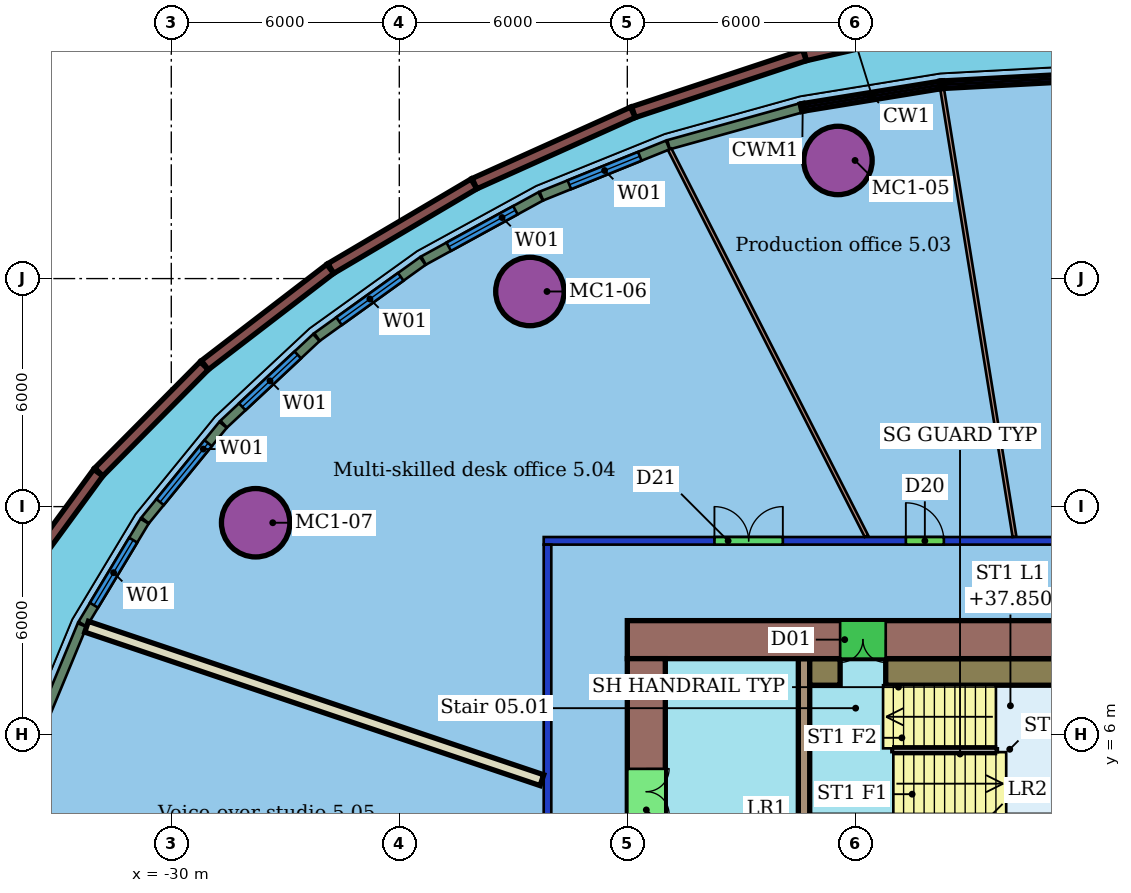
"""IFC4 building model, lengths in metres.
Left out: names, types, materials, properties, quantities, classifications, styles, units other than length and angle.
Written with IfcOpenShell. Run it as: python <this file> out.ifc"""

import sys

from ifc_helpers import new_model, si_unit, direction, frame, frame_2d, origin, origin_2d, place, context, subcontext, project, spatial, rectangle, hollow_circle, extrude, element, fill, save


model = new_model("IFC4")
c1 = context("Model", 3, precision=1e-05, world=origin(), true_north=direction((0.0, 1.0)))
c2 = subcontext(c1, "Body", "Model", "MODEL_VIEW")
j1 = project(units=[si_unit("LENGTHUNIT", "METRE"), si_unit("PLANEANGLEUNIT", "RADIAN")], contexts=[c1])
p1 = place(None, origin())
s1 = spatial("IfcSite", under=j1, at=p1, CompositionType="ELEMENT")
p2 = place(p1, origin())
s2 = spatial("IfcBuilding", under=s1, at=p2, CompositionType="ELEMENT")
p3 = place(p2, frame((0.0, 0.0, 36.0)))
s3 = spatial("IfcBuildingStorey", under=s2, at=p3, CompositionType="ELEMENT", Elevation=36.0)
for number, where, z_axis, x_axis in (
    (1, (-12.458, 21.108, 0.0), (0.0, 0.0, 1.0), (1.0, 0.0, 0.0)),
    (2, (-20.563, 17.66, 0.0), (0.0, 0.0, 1.0), (1.0, 0.0, 0.0)),
    (3, (-27.78, 11.576, 0.0), (0.0, 0.0, 1.0), (1.0, 0.0, 0.0)),
):
    element("IfcColumn", number, at=place(p3, frame(where, z_axis=z_axis, x_axis=x_axis)), inside=s3, PredefinedType="COLUMN", context=c2, shape_type="SweptSolid", body=[
        extrude(hollow_circle(Radius=0.9, WallThickness=0.06, at=origin_2d()), origin(), (0.0, 0.0, 1.0), 3.55),
    ])
p4 = place(p3, frame((-20.1, -11.0, 0.0), z_axis=(0.0, 0.0, 1.0), x_axis=(0.0, 1.0, 0.0)))
e4 = element("IfcWall", 4, at=p4, inside=s3, PredefinedType="PARTITIONING", context=c2, shape_type="SweptSolid", body=[
    extrude(rectangle(XDim=22.0, YDim=0.2, at=frame_2d((11.0, 0.0))), origin(), (0.0, 0.0, 1.0), 2.85),
])
p5 = place(p4, frame((13.38, 0.0, 0.0)))
e5 = element("IfcOpeningElement", 5, at=p5, cuts=e4, PredefinedType="OPENING", context=c2, shape_type="SweptSolid", body=[
    extrude(rectangle(XDim=1.1, YDim=2.1, at=frame_2d((0.55, 1.05))), frame((0.0, 0.11, 0.0), z_axis=(0.0, -1.0, 0.0), x_axis=(1.0, 0.0, 0.0)), (0.0, 0.0, 1.0), 0.22),
])
p6 = place(p4, frame((6.18, 0.0, 0.0)))
e6 = element("IfcOpeningElement", 6, at=p6, cuts=e4, PredefinedType="OPENING", context=c2, shape_type="SweptSolid", body=[
    extrude(rectangle(XDim=1.8, YDim=2.1, at=frame_2d((0.9, 1.05))), frame((0.0, 0.11, 0.0), z_axis=(0.0, -1.0, 0.0), x_axis=(1.0, 0.0, 0.0)), (0.0, 0.0, 1.0), 0.22),
])
p7 = place(p3, frame((-20.2, 11.1, 0.0), z_axis=(0.0, 0.0, 1.0), x_axis=(1.0, 0.0, 0.0)))
e7 = element("IfcWall", 7, at=p7, inside=s3, PredefinedType="PARTITIONING", context=c2, shape_type="SweptSolid", body=[
    extrude(rectangle(XDim=28.4, YDim=0.2, at=frame_2d((14.2, 0.0))), origin(), (0.0, 0.0, 1.0), 2.85),
])
p8 = place(p7, frame((16.853, 0.0, 0.0)))
e8 = element("IfcOpeningElement", 8, at=p8, cuts=e7, PredefinedType="OPENING", context=c2, shape_type="SweptSolid", body=[
    extrude(rectangle(XDim=1.8, YDim=2.1, at=frame_2d((0.9, 1.05))), frame((0.0, 0.11, 0.0), z_axis=(0.0, -1.0, 0.0), x_axis=(1.0, 0.0, 0.0)), (0.0, 0.0, 1.0), 0.22),
])
p9 = place(p7, frame((9.53, 0.0, 0.0)))
e9 = element("IfcOpeningElement", 9, at=p9, cuts=e7, PredefinedType="OPENING", context=c2, shape_type="SweptSolid", body=[
    extrude(rectangle(XDim=1.0, YDim=2.1, at=frame_2d((0.5, 1.05))), frame((0.0, 0.11, 0.0), z_axis=(0.0, -1.0, 0.0), x_axis=(1.0, 0.0, 0.0)), (0.0, 0.0, 1.0), 0.22),
])
p10 = place(p7, frame((4.492, 0.0, 0.0)))
e10 = element("IfcOpeningElement", 10, at=p10, cuts=e7, PredefinedType="OPENING", context=c2, shape_type="SweptSolid", body=[
    extrude(rectangle(XDim=1.8, YDim=2.1, at=frame_2d((0.9, 1.05))), frame((0.0, 0.11, 0.0), z_axis=(0.0, -1.0, 0.0), x_axis=(1.0, 0.0, 0.0)), (0.0, 0.0, 1.0), 0.22),
])
p11 = place(p3, frame((-9.714, 22.976, 0.0), z_axis=(0.0, 0.0, 1.0), x_axis=(0.159567915993, -0.987186953006, 0.0)))
e11 = element("IfcWall", 11, at=p11, inside=s3, PredefinedType="PARTITIONING", context=c2, shape_type="SweptSolid", body=[
    extrude(rectangle(XDim=11.92, YDim=0.1, at=frame_2d((5.96, 0.0))), origin(), (0.0, 0.0, 1.0), 3.55),
])
p12 = place(p3, frame((-16.885, 21.401, 0.0), z_axis=(0.0, 0.0, 1.0), x_axis=(0.453334779339, -0.89134032661, 0.0)))
e12 = element("IfcWall", 12, at=p12, inside=s3, PredefinedType="PARTITIONING", context=c2, shape_type="SweptSolid", body=[
    extrude(rectangle(XDim=11.419, YDim=0.1, at=frame_2d((5.709, 0.0))), origin(), (0.0, 0.0, 1.0), 3.55),
])
p13 = place(p3, frame((-32.229, 8.84, 0.0), z_axis=(0.0, 0.0, 1.0), x_axis=(0.947633412756, -0.319360165063, 0.0)))
e13 = element("IfcWall", 13, at=p13, inside=s3, PredefinedType="PARTITIONING", context=c2, shape_type="SweptSolid", body=[
    extrude(rectangle(XDim=12.643, YDim=0.3, at=frame_2d((6.321, 0.0))), origin(), (0.0, 0.0, 1.0), 3.55),
])
p14 = place(p3, frame((-13.443, 22.488, 0.0), z_axis=(0.0, 0.0, 1.0), x_axis=(-0.963430499259, -0.267958342093, 0.0)))
e14 = element("IfcWall", 14, at=p14, inside=s3, PredefinedType="SOLIDWALL", context=c2, shape_type="SweptSolid", body=[
    extrude(rectangle(XDim=3.604, YDim=0.25, at=frame_2d((1.802, 0.0))), origin(), (0.0, 0.0, 1.0), 3.15),
])
p15 = place(p3, frame((-16.935, 21.515, 0.0), z_axis=(0.0, 0.0, 1.0), x_axis=(-0.927147291409, -0.374697077694, 0.0)))
e15 = element("IfcWall", 15, at=p15, inside=s3, PredefinedType="SOLIDWALL", context=c2, shape_type="SweptSolid", body=[
    extrude(rectangle(XDim=3.588, YDim=0.25, at=frame_2d((1.794, 0.0))), origin(), (0.0, 0.0, 1.0), 3.15),
])
p16 = place(p15, frame((0.794, 0.0, 0.8)))
e16 = element("IfcOpeningElement", 16, at=p16, cuts=e15, PredefinedType="OPENING", context=c2, shape_type="SweptSolid", body=[
    extrude(rectangle(XDim=2.0, YDim=2.2, at=frame_2d((1.0, 1.1))), frame((0.0, 0.135, 0.0), z_axis=(0.0, -1.0, 0.0), x_axis=(1.0, 0.0, 0.0)), (0.0, 0.0, 1.0), 0.27),
])
p17 = place(p3, frame((-20.282, 20.162, 0.0), z_axis=(0.0, 0.0, 1.0), x_axis=(-0.8771213679, -0.480268785134, 0.0)))
e17 = element("IfcWall", 17, at=p17, inside=s3, PredefinedType="SOLIDWALL", context=c2, shape_type="SweptSolid", body=[
    extrude(rectangle(XDim=3.512, YDim=0.25, at=frame_2d((1.756, 0.0))), origin(), (0.0, 0.0, 1.0), 3.15),
])
p18 = place(p17, frame((0.756, 0.0, 0.8)))
e18 = element("IfcOpeningElement", 18, at=p18, cuts=e17, PredefinedType="OPENING", context=c2, shape_type="SweptSolid", body=[
    extrude(rectangle(XDim=2.0, YDim=2.2, at=frame_2d((1.0, 1.1))), frame((0.0, 0.135, 0.0), z_axis=(0.0, -1.0, 0.0), x_axis=(1.0, 0.0, 0.0)), (0.0, 0.0, 1.0), 0.27),
])
p19 = place(p3, frame((-23.382, 18.462, 0.0), z_axis=(0.0, 0.0, 1.0), x_axis=(-0.812059685452, -0.5835743888, 0.0)))
e19 = element("IfcWall", 19, at=p19, inside=s3, PredefinedType="SOLIDWALL", context=c2, shape_type="SweptSolid", body=[
    extrude(rectangle(XDim=3.427, YDim=0.25, at=frame_2d((1.713, 0.0))), origin(), (0.0, 0.0, 1.0), 3.15),
])
p20 = place(p19, frame((0.713, 0.0, 0.8)))
e20 = element("IfcOpeningElement", 20, at=p20, cuts=e19, PredefinedType="OPENING", context=c2, shape_type="SweptSolid", body=[
    extrude(rectangle(XDim=2.0, YDim=2.2, at=frame_2d((1.0, 1.1))), frame((0.0, 0.135, 0.0), z_axis=(0.0, -1.0, 0.0), x_axis=(1.0, 0.0, 0.0)), (0.0, 0.0, 1.0), 0.27),
])
p21 = place(p3, frame((-26.183, 16.448, 0.0), z_axis=(0.0, 0.0, 1.0), x_axis=(-0.730670592597, -0.682730170063, 0.0)))
e21 = element("IfcWall", 21, at=p21, inside=s3, PredefinedType="SOLIDWALL", context=c2, shape_type="SweptSolid", body=[
    extrude(rectangle(XDim=3.336, YDim=0.25, at=frame_2d((1.668, 0.0))), origin(), (0.0, 0.0, 1.0), 3.15),
])
p22 = place(p21, frame((0.668, 0.0, 0.8)))
e22 = element("IfcOpeningElement", 22, at=p22, cuts=e21, PredefinedType="OPENING", context=c2, shape_type="SweptSolid", body=[
    extrude(rectangle(XDim=2.0, YDim=2.2, at=frame_2d((1.0, 1.1))), frame((0.0, 0.135, 0.0), z_axis=(0.0, -1.0, 0.0), x_axis=(1.0, 0.0, 0.0)), (0.0, 0.0, 1.0), 0.27),
])
p23 = place(p3, frame((-28.637, 14.152, 0.0), z_axis=(0.0, 0.0, 1.0), x_axis=(-0.631970989947, -0.774992043743, 0.0)))
e23 = element("IfcWall", 23, at=p23, inside=s3, PredefinedType="SOLIDWALL", context=c2, shape_type="SweptSolid", body=[
    extrude(rectangle(XDim=3.245, YDim=0.25, at=frame_2d((1.623, 0.0))), origin(), (0.0, 0.0, 1.0), 3.15),
])
p24 = place(p23, frame((0.623, 0.0, 0.8)))
e24 = element("IfcOpeningElement", 24, at=p24, cuts=e23, PredefinedType="OPENING", context=c2, shape_type="SweptSolid", body=[
    extrude(rectangle(XDim=2.0, YDim=2.2, at=frame_2d((1.0, 1.1))), frame((0.0, 0.135, 0.0), z_axis=(0.0, -1.0, 0.0), x_axis=(1.0, 0.0, 0.0)), (0.0, 0.0, 1.0), 0.27),
])
p25 = place(p3, frame((-30.703, 11.616, 0.0), z_axis=(0.0, 0.0, 1.0), x_axis=(-0.51563096518, -0.856810777096, 0.0)))
e25 = element("IfcWall", 25, at=p25, inside=s3, PredefinedType="SOLIDWALL", context=c2, shape_type="SweptSolid", body=[
    extrude(rectangle(XDim=3.161, YDim=0.25, at=frame_2d((1.581, 0.0))), origin(), (0.0, 0.0, 1.0), 3.15),
])
p26 = place(p25, frame((0.581, 0.0, 0.8)))
e26 = element("IfcOpeningElement", 26, at=p26, cuts=e25, PredefinedType="OPENING", context=c2, shape_type="SweptSolid", body=[
    extrude(rectangle(XDim=2.0, YDim=2.2, at=frame_2d((1.0, 1.1))), frame((0.0, 0.135, 0.0), z_axis=(0.0, -1.0, 0.0), x_axis=(1.0, 0.0, 0.0)), (0.0, 0.0, 1.0), 0.27),
])
p27 = place(p3, frame((-32.345, 8.884, 0.0), z_axis=(0.0, 0.0, 1.0), x_axis=(-0.382665181283, -0.923887092146, 0.0)))
e27 = element("IfcWall", 27, at=p27, inside=s3, PredefinedType="SOLIDWALL", context=c2, shape_type="SweptSolid", body=[
    extrude(rectangle(XDim=3.05, YDim=0.25, at=frame_2d((1.525, 0.0))), origin(), (0.0, 0.0, 1.0), 3.15),
])
p28 = place(p3, frame((-8.57, 24.965, 0.0), z_axis=(0.0, 0.0, 1.0), x_axis=(-0.974849806662, -0.222862860186, 0.0)))
e28 = element("IfcWall", 28, at=p28, inside=s3, PredefinedType="PARAPET", context=c2, shape_type="SweptSolid", body=[
    extrude(rectangle(XDim=4.877, YDim=0.3, at=frame_2d((2.438, 0.0))), origin(), (0.0, 0.0, 1.0), 1.1),
])
p29 = place(p3, frame((-13.338, 23.875, 0.0), z_axis=(0.0, 0.0, 1.0), x_axis=(-0.949007114017, -0.315254655071, 0.0)))
e29 = element("IfcWall", 29, at=p29, inside=s3, PredefinedType="PARAPET", context=c2, shape_type="SweptSolid", body=[
    extrude(rectangle(XDim=4.743, YDim=0.3, at=frame_2d((2.371, 0.0))), origin(), (0.0, 0.0, 1.0), 1.1),
])
p30 = place(p3, frame((-17.853, 22.374, 0.0), z_axis=(0.0, 0.0, 1.0), x_axis=(-0.911912513487, -0.410384658274, 0.0)))
e30 = element("IfcWall", 30, at=p30, inside=s3, PredefinedType="PARAPET", context=c2, shape_type="SweptSolid", body=[
    extrude(rectangle(XDim=4.573, YDim=0.3, at=frame_2d((2.286, 0.0))), origin(), (0.0, 0.0, 1.0), 1.1),
])
p31 = place(p3, frame((-22.037, 20.49, 0.0), z_axis=(0.0, 0.0, 1.0), x_axis=(-0.861027611146, -0.508558209888, 0.0)))
e31 = element("IfcWall", 31, at=p31, inside=s3, PredefinedType="PARAPET", context=c2, shape_type="SweptSolid", body=[
    extrude(rectangle(XDim=4.375, YDim=0.3, at=frame_2d((2.188, 0.0))), origin(), (0.0, 0.0, 1.0), 1.1),
])
p32 = place(p3, frame((-25.818, 18.255, 0.0), z_axis=(0.0, 0.0, 1.0), x_axis=(-0.793088450724, -0.609106484392, 0.0)))
e32 = element("IfcWall", 32, at=p32, inside=s3, PredefinedType="PARAPET", context=c2, shape_type="SweptSolid", body=[
    extrude(rectangle(XDim=4.16, YDim=0.3, at=frame_2d((2.08, 0.0))), origin(), (0.0, 0.0, 1.0), 1.1),
])
p33 = place(p3, frame((-29.132, 15.708, 0.0), z_axis=(0.0, 0.0, 1.0), x_axis=(-0.704282546554, -0.709919780412, 0.0)))
e33 = element("IfcWall", 33, at=p33, inside=s3, PredefinedType="PARAPET", context=c2, shape_type="SweptSolid", body=[
    extrude(rectangle(XDim=3.941, YDim=0.3, at=frame_2d((1.971, 0.0))), origin(), (0.0, 0.0, 1.0), 1.1),
])
p34 = place(p3, frame((-31.922, 12.894, 0.0), z_axis=(0.0, 0.0, 1.0), x_axis=(-0.590742651478, -0.806860037258, 0.0)))
e34 = element("IfcWall", 34, at=p34, inside=s3, PredefinedType="PARAPET", context=c2, shape_type="SweptSolid", body=[
    extrude(rectangle(XDim=3.734, YDim=0.3, at=frame_2d((1.867, 0.0))), origin(), (0.0, 0.0, 1.0), 1.1),
])
p35 = place(p3, frame((-6.0, 8.5, 0.0), z_axis=(0.0, 0.0, 1.0), x_axis=(-1.0, 0.0, 0.0)))
e35 = element("IfcWall", 35, at=p35, inside=s3, PredefinedType="SHEAR", context=c2, shape_type="SweptSolid", body=[
    extrude(rectangle(XDim=12.0, YDim=1.0, at=frame_2d((6.0, 0.0))), origin(), (0.0, 0.0, 1.0), 3.4),
])
p36 = place(p35, frame((5.2, 0.0, 0.0)))
e36 = element("IfcOpeningElement", 36, at=p36, cuts=e35, PredefinedType="OPENING", context=c2, shape_type="SweptSolid", body=[
    extrude(rectangle(XDim=1.2, YDim=2.1, at=frame_2d((0.6, 1.05))), frame((0.0, 0.51, 0.0), z_axis=(0.0, -1.0, 0.0), x_axis=(1.0, 0.0, 0.0)), (0.0, 0.0, 1.0), 1.02),
])
p37 = place(p3, frame((-17.5, 8.0, 0.0), z_axis=(0.0, 0.0, 1.0), x_axis=(0.0, -1.0, 0.0)))
e37 = element("IfcWall", 37, at=p37, inside=s3, PredefinedType="SHEAR", context=c2, shape_type="SweptSolid", body=[
    extrude(rectangle(XDim=16.0, YDim=1.0, at=frame_2d((8.0, 0.0))), origin(), (0.0, 0.0, 1.0), 3.4),
])
p38 = place(p37, frame((11.9, 0.0, 0.0)))
e38 = element("IfcOpeningElement", 38, at=p38, cuts=e37, PredefinedType="OPENING", context=c2, shape_type="SweptSolid", body=[
    extrude(rectangle(XDim=1.2, YDim=2.1, at=frame_2d((0.6, 1.05))), frame((0.0, 0.51, 0.0), z_axis=(0.0, -1.0, 0.0), x_axis=(1.0, 0.0, 0.0)), (0.0, 0.0, 1.0), 1.02),
])
p39 = place(p37, frame((2.9, 0.0, 0.0)))
e39 = element("IfcOpeningElement", 39, at=p39, cuts=e37, PredefinedType="OPENING", context=c2, shape_type="SweptSolid", body=[
    extrude(rectangle(XDim=1.2, YDim=2.1, at=frame_2d((0.6, 1.05))), frame((0.0, 0.51, 0.0), z_axis=(0.0, -1.0, 0.0), x_axis=(1.0, 0.0, 0.0)), (0.0, 0.0, 1.0), 1.02),
])
p40 = place(p3, frame((-13.35, 8.0, 0.0), z_axis=(0.0, 0.0, 1.0), x_axis=(0.0, -1.0, 0.0)))
e40 = element("IfcWall", 40, at=p40, inside=s3, PredefinedType="SHEAR", context=c2, shape_type="SweptSolid", body=[
    extrude(rectangle(XDim=16.0, YDim=0.3, at=frame_2d((8.0, 0.0))), origin(), (0.0, 0.0, 1.0), 3.4),
])
p41 = place(p40, frame((7.25, 0.0, 0.0)))
e41 = element("IfcOpeningElement", 41, at=p41, cuts=e40, PredefinedType="OPENING", context=c2, shape_type="SweptSolid", body=[
    extrude(rectangle(XDim=1.5, YDim=2.1, at=frame_2d((0.75, 1.05))), frame((0.0, 0.16, 0.0), z_axis=(0.0, -1.0, 0.0), x_axis=(1.0, 0.0, 0.0)), (0.0, 0.0, 1.0), 0.32),
])
p42 = place(p3, frame((-13.2, 7.65, 0.0), z_axis=(0.0, 0.0, 1.0), x_axis=(1.0, 0.0, 0.0)))
e42 = element("IfcWall", 42, at=p42, inside=s3, PredefinedType="SHEAR", context=c2, shape_type="SweptSolid", body=[
    extrude(rectangle(XDim=0.8, YDim=0.7, at=frame_2d((0.4, 0.0))), origin(), (0.0, 0.0, 1.0), 3.4),
])
p43 = place(p3, frame((-11.2, 7.65, 0.0), z_axis=(0.0, 0.0, 1.0), x_axis=(1.0, 0.0, 0.0)))
e43 = element("IfcWall", 43, at=p43, inside=s3, PredefinedType="SHEAR", context=c2, shape_type="SweptSolid", body=[
    extrude(rectangle(XDim=5.05, YDim=0.7, at=frame_2d((2.525, 0.0))), origin(), (0.0, 0.0, 1.0), 3.4),
])
p44 = place(p9, origin())
e44 = element("IfcDoor", 44, at=p44, inside=s3, OperationType="SINGLE_SWING_LEFT", PredefinedType="DOOR", context=c2, shape_type="SweptSolid", body=[
    extrude(rectangle(XDim=1.0, YDim=2.1, at=frame_2d((0.5, 1.05))), frame((0.0, 0.025, 0.0), z_axis=(0.0, -1.0, 0.0), x_axis=(1.0, 0.0, 0.0)), (0.0, 0.0, 1.0), 0.05),
])
fill(e9, e44)
p45 = place(p10, origin())
e45 = element("IfcDoor", 45, at=p45, inside=s3, OperationType="DOUBLE_DOOR_SINGLE_SWING", PredefinedType="DOOR", context=c2, shape_type="SweptSolid", body=[
    extrude(rectangle(XDim=1.8, YDim=2.1, at=frame_2d((0.9, 1.05))), frame((0.0, 0.025, 0.0), z_axis=(0.0, -1.0, 0.0), x_axis=(1.0, 0.0, 0.0)), (0.0, 0.0, 1.0), 0.05),
])
fill(e10, e45)
p46 = place(p16, origin())
e46 = element("IfcWindow", 46, at=p46, inside=s3, PartitioningType="SINGLE_PANEL", PredefinedType="WINDOW", context=c2, shape_type="SweptSolid", body=[
    extrude(rectangle(XDim=2.0, YDim=2.2, at=frame_2d((1.0, 1.1))), frame((0.0, 0.03, 0.0), z_axis=(0.0, -1.0, 0.0), x_axis=(1.0, 0.0, 0.0)), (0.0, 0.0, 1.0), 0.06),
])
fill(e16, e46)
p47 = place(p18, origin())
e47 = element("IfcWindow", 47, at=p47, inside=s3, PartitioningType="SINGLE_PANEL", PredefinedType="WINDOW", context=c2, shape_type="SweptSolid", body=[
    extrude(rectangle(XDim=2.0, YDim=2.2, at=frame_2d((1.0, 1.1))), frame((0.0, 0.03, 0.0), z_axis=(0.0, -1.0, 0.0), x_axis=(1.0, 0.0, 0.0)), (0.0, 0.0, 1.0), 0.06),
])
fill(e18, e47)
p48 = place(p20, origin())
e48 = element("IfcWindow", 48, at=p48, inside=s3, PartitioningType="SINGLE_PANEL", PredefinedType="WINDOW", context=c2, shape_type="SweptSolid", body=[
    extrude(rectangle(XDim=2.0, YDim=2.2, at=frame_2d((1.0, 1.1))), frame((0.0, 0.03, 0.0), z_axis=(0.0, -1.0, 0.0), x_axis=(1.0, 0.0, 0.0)), (0.0, 0.0, 1.0), 0.06),
])
fill(e20, e48)
p49 = place(p22, origin())
e49 = element("IfcWindow", 49, at=p49, inside=s3, PartitioningType="SINGLE_PANEL", PredefinedType="WINDOW", context=c2, shape_type="SweptSolid", body=[
    extrude(rectangle(XDim=2.0, YDim=2.2, at=frame_2d((1.0, 1.1))), frame((0.0, 0.03, 0.0), z_axis=(0.0, -1.0, 0.0), x_axis=(1.0, 0.0, 0.0)), (0.0, 0.0, 1.0), 0.06),
])
fill(e22, e49)
p50 = place(p24, origin())
e50 = element("IfcWindow", 50, at=p50, inside=s3, PartitioningType="SINGLE_PANEL", PredefinedType="WINDOW", context=c2, shape_type="SweptSolid", body=[
    extrude(rectangle(XDim=2.0, YDim=2.2, at=frame_2d((1.0, 1.1))), frame((0.0, 0.03, 0.0), z_axis=(0.0, -1.0, 0.0), x_axis=(1.0, 0.0, 0.0)), (0.0, 0.0, 1.0), 0.06),
])
fill(e24, e50)
p51 = place(p26, origin())
e51 = element("IfcWindow", 51, at=p51, inside=s3, PartitioningType="SINGLE_PANEL", PredefinedType="WINDOW", context=c2, shape_type="SweptSolid", body=[
    extrude(rectangle(XDim=2.0, YDim=2.2, at=frame_2d((1.0, 1.1))), frame((0.0, 0.03, 0.0), z_axis=(0.0, -1.0, 0.0), x_axis=(1.0, 0.0, 0.0)), (0.0, 0.0, 1.0), 0.06),
])
fill(e26, e51)
p52 = place(p36, origin())
e52 = element("IfcDoor", 52, at=p52, inside=s3, OperationType="DOUBLE_DOOR_SINGLE_SWING", PredefinedType="NOTDEFINED", context=c2, shape_type="SweptSolid", body=[
    extrude(rectangle(XDim=1.2, YDim=2.1, at=frame_2d((0.6, 1.05))), frame((0.0, 0.025, 0.0), z_axis=(0.0, -1.0, 0.0), x_axis=(1.0, 0.0, 0.0)), (0.0, 0.0, 1.0), 0.05),
])
fill(e36, e52)
p53 = place(p39, origin())
e53 = element("IfcDoor", 53, at=p53, inside=s3, OperationType="DOUBLE_DOOR_SINGLE_SWING", PredefinedType="NOTDEFINED", context=c2, shape_type="SweptSolid", body=[
    extrude(rectangle(XDim=1.2, YDim=2.1, at=frame_2d((0.6, 1.05))), frame((0.0, 0.025, 0.0), z_axis=(0.0, -1.0, 0.0), x_axis=(1.0, 0.0, 0.0)), (0.0, 0.0, 1.0), 0.05),
])
fill(e39, e53)
save(model, sys.argv[1])
